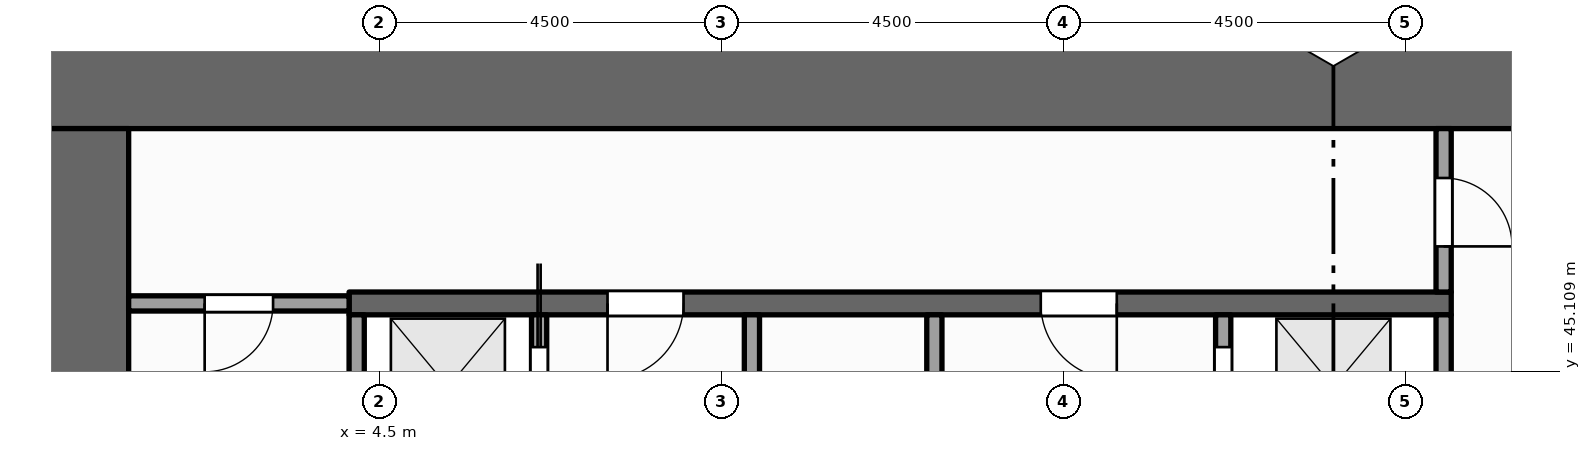
"""IFC4 building model, lengths in metres.
Left out: names, types, materials, properties, quantities, classifications, styles, units other than length and angle.
Written with IfcOpenShell. Run it as: python <this file> out.ifc"""

import sys

from ifc_helpers import new_model, si_unit, direction, frame, frame_2d, origin, place, context, subcontext, project, spatial, rectangle, extrude, element, fill, save


model = new_model("IFC4")
c1 = context("Model", 3, precision=1e-05, world=origin(), true_north=direction((0.0, 1.0)))
c2 = subcontext(c1, "Body", "Model", "MODEL_VIEW")
j1 = project(units=[si_unit("LENGTHUNIT", "METRE"), si_unit("PLANEANGLEUNIT", "RADIAN")], contexts=[c1])
p1 = place(None, origin())
s1 = spatial("IfcSite", under=j1, at=p1, CompositionType="ELEMENT")
p2 = place(p1, origin())
s2 = spatial("IfcBuilding", under=s1, at=p2, CompositionType="ELEMENT")
p3 = place(p2, frame((0.0, 0.0, 61.0)))
s3 = spatial("IfcBuildingStorey", under=s2, at=p3, CompositionType="ELEMENT", Elevation=61.0)
p4 = place(p3, frame((0.0, 48.9, -0.15), z_axis=(0.0, 0.0, 1.0), x_axis=(1.0, 0.0, 0.0)))
e1 = element("IfcWall", 1, at=p4, inside=s3, PredefinedType="SHEAR", context=c2, shape_type="SweptSolid", body=[
    extrude(rectangle(XDim=22.5, YDim=1.2, at=frame_2d((11.25, 0.0))), origin(), (0.0, 0.0, 1.0), 4.0),
])
p5 = place(p3, frame((0.6, 37.2, -0.15), z_axis=(0.0, 0.0, 1.0), x_axis=(0.0, 1.0, 0.0)))
e2 = element("IfcWall", 2, at=p5, inside=s3, PredefinedType="SHEAR", context=c2, shape_type="SweptSolid", body=[
    extrude(rectangle(XDim=11.1, YDim=1.2, at=frame_2d((5.55, 0.0))), origin(), (0.0, 0.0, 1.0), 4.0),
])
p6 = place(p3, frame((4.2, 43.525, 0.0), z_axis=(0.0, 0.0, 1.0), x_axis=(0.0, 1.0, 0.0)))
e3 = element("IfcWall", 3, at=p6, inside=s3, PredefinedType="SOLIDWALL", context=c2, shape_type="SweptSolid", body=[
    extrude(rectangle(XDim=2.325, YDim=0.2, at=frame_2d((1.163, 0.0))), origin(), (0.0, 0.0, 1.0), 3.85),
])
p7 = place(p3, frame((6.6, 37.2, 0.0), z_axis=(0.0, 0.0, 1.0), x_axis=(0.0, 1.0, 0.0)))
e4 = element("IfcWall", 4, at=p7, inside=s3, PredefinedType="SOLIDWALL", context=c2, shape_type="SweptSolid", body=[
    extrude(rectangle(XDim=8.65, YDim=0.2, at=frame_2d((4.325, 0.0))), origin(), (0.0, 0.0, 1.0), 3.85),
])
p8 = place(p7, frame((0.5, 0.0, 0.012)))
e5 = element("IfcOpeningElement", 5, at=p8, cuts=e4, PredefinedType="OPENING", context=c2, shape_type="SweptSolid", body=[
    extrude(rectangle(XDim=1.1, YDim=2.1, at=frame_2d((0.55, 1.05))), frame((0.0, 0.11, 0.0), z_axis=(0.0, -1.0, 0.0), x_axis=(1.0, 0.0, 0.0)), (0.0, 0.0, 1.0), 0.22),
])
p9 = place(p7, frame((2.75, 0.0, 0.012)))
e6 = element("IfcOpeningElement", 6, at=p9, cuts=e4, PredefinedType="OPENING", context=c2, shape_type="SweptSolid", body=[
    extrude(rectangle(XDim=1.1, YDim=2.1, at=frame_2d((0.55, 1.05))), frame((0.0, 0.11, 0.0), z_axis=(0.0, -1.0, 0.0), x_axis=(1.0, 0.0, 0.0)), (0.0, 0.0, 1.0), 0.22),
])
p10 = place(p7, frame((4.95, 0.0, 0.012)))
e7 = element("IfcOpeningElement", 7, at=p10, cuts=e4, PredefinedType="OPENING", context=c2, shape_type="SweptSolid", body=[
    extrude(rectangle(XDim=1.1, YDim=2.1, at=frame_2d((0.55, 1.05))), frame((0.0, 0.11, 0.0), z_axis=(0.0, -1.0, 0.0), x_axis=(1.0, 0.0, 0.0)), (0.0, 0.0, 1.0), 0.22),
])
p11 = place(p7, frame((7.125, 0.0, 0.012)))
e8 = element("IfcOpeningElement", 8, at=p11, cuts=e4, PredefinedType="OPENING", context=c2, shape_type="SweptSolid", body=[
    extrude(rectangle(XDim=1.1, YDim=2.1, at=frame_2d((0.55, 1.05))), frame((0.0, 0.11, 0.0), z_axis=(0.0, -1.0, 0.0), x_axis=(1.0, 0.0, 0.0)), (0.0, 0.0, 1.0), 0.22),
])
p12 = place(p3, frame((9.4, 37.2, 0.0), z_axis=(0.0, 0.0, 1.0), x_axis=(0.0, 1.0, 0.0)))
e9 = element("IfcWall", 9, at=p12, inside=s3, PredefinedType="PARTITIONING", context=c2, shape_type="SweptSolid", body=[
    extrude(rectangle(XDim=8.65, YDim=0.2, at=frame_2d((4.325, 0.0))), origin(), (0.0, 0.0, 1.0), 3.85),
])
p13 = place(p12, frame((3.875, 0.0, 0.0)))
e10 = element("IfcOpeningElement", 10, at=p13, cuts=e9, PredefinedType="OPENING", context=c2, shape_type="SweptSolid", body=[
    extrude(rectangle(XDim=0.9, YDim=2.1, at=frame_2d((0.45, 1.05))), frame((0.0, 0.11, 0.0), z_axis=(0.0, -1.0, 0.0), x_axis=(1.0, 0.0, 0.0)), (0.0, 0.0, 1.0), 0.22),
])
p14 = place(p3, frame((11.8, 37.2, 0.0), z_axis=(0.0, 0.0, 1.0), x_axis=(0.0, 1.0, 0.0)))
e11 = element("IfcWall", 11, at=p14, inside=s3, PredefinedType="PARTITIONING", context=c2, shape_type="SweptSolid", body=[
    extrude(rectangle(XDim=8.65, YDim=0.2, at=frame_2d((4.325, 0.0))), origin(), (0.0, 0.0, 1.0), 3.85),
])
p15 = place(p3, frame((15.6, 43.7, 0.0), z_axis=(0.0, 0.0, 1.0), x_axis=(0.0, 1.0, 0.0)))
e12 = element("IfcWall", 12, at=p15, inside=s3, PredefinedType="SOLIDWALL", context=c2, shape_type="SweptSolid", body=[
    extrude(rectangle(XDim=2.15, YDim=0.2, at=frame_2d((1.075, 0.0))), origin(), (0.0, 0.0, 1.0), 3.85),
])
p16 = place(p15, frame((0.625, 0.0, 0.012)))
e13 = element("IfcOpeningElement", 13, at=p16, cuts=e12, PredefinedType="OPENING", context=c2, shape_type="SweptSolid", body=[
    extrude(rectangle(XDim=1.1, YDim=2.1, at=frame_2d((0.55, 1.05))), frame((0.0, 0.11, 0.0), z_axis=(0.0, -1.0, 0.0), x_axis=(1.0, 0.0, 0.0)), (0.0, 0.0, 1.0), 0.22),
])
p17 = place(p3, frame((18.5, 43.7, 0.0), z_axis=(0.0, 0.0, 1.0), x_axis=(0.0, 1.0, 0.0)))
e14 = element("IfcWall", 14, at=p17, inside=s3, PredefinedType="SOLIDWALL", context=c2, shape_type="SweptSolid", body=[
    extrude(rectangle(XDim=2.15, YDim=0.2, at=frame_2d((1.075, 0.0))), origin(), (0.0, 0.0, 1.0), 3.85),
])
p18 = place(p3, frame((18.5, 46.15, 0.0), z_axis=(0.0, 0.0, 1.0), x_axis=(0.0, 1.0, 0.0)))
e15 = element("IfcWall", 15, at=p18, inside=s3, PredefinedType="PARTITIONING", context=c2, shape_type="SweptSolid", body=[
    extrude(rectangle(XDim=2.15, YDim=0.2, at=frame_2d((1.075, 0.0))), origin(), (0.0, 0.0, 1.0), 3.85),
])
p19 = place(p18, frame((0.6, 0.0, 0.0)))
e16 = element("IfcOpeningElement", 16, at=p19, cuts=e15, PredefinedType="OPENING", context=c2, shape_type="SweptSolid", body=[
    extrude(rectangle(XDim=0.9, YDim=2.1, at=frame_2d((0.45, 1.05))), frame((0.0, 0.11, 0.0), z_axis=(0.0, -1.0, 0.0), x_axis=(1.0, 0.0, 0.0)), (0.0, 0.0, 1.0), 0.22),
])
p20 = place(p3, frame((1.2, 46.0, 0.0), z_axis=(0.0, 0.0, 1.0), x_axis=(1.0, 0.0, 0.0)))
e17 = element("IfcWall", 17, at=p20, inside=s3, PredefinedType="PARTITIONING", context=c2, shape_type="SweptSolid", body=[
    extrude(rectangle(XDim=2.9, YDim=0.2, at=frame_2d((1.45, 0.0))), origin(), (0.0, 0.0, 1.0), 3.85),
])
p21 = place(p20, frame((1.0, 0.0, 0.0)))
e18 = element("IfcOpeningElement", 18, at=p21, cuts=e17, PredefinedType="OPENING", context=c2, shape_type="SweptSolid", body=[
    extrude(rectangle(XDim=0.9, YDim=2.1, at=frame_2d((0.45, 1.05))), frame((0.0, 0.11, 0.0), z_axis=(0.0, -1.0, 0.0), x_axis=(1.0, 0.0, 0.0)), (0.0, 0.0, 1.0), 0.22),
])
p22 = place(p3, frame((4.1, 46.0, 0.0), z_axis=(0.0, 0.0, 1.0), x_axis=(1.0, 0.0, 0.0)))
e19 = element("IfcWall", 19, at=p22, inside=s3, PredefinedType="SHEAR", context=c2, shape_type="SweptSolid", body=[
    extrude(rectangle(XDim=14.5, YDim=0.3, at=frame_2d((7.25, 0.0))), origin(), (0.0, 0.0, 1.0), 3.85),
])
p23 = place(p22, frame((3.4, 0.0, 0.0)))
e20 = element("IfcOpeningElement", 20, at=p23, cuts=e19, PredefinedType="OPENING", context=c2, shape_type="SweptSolid", body=[
    extrude(rectangle(XDim=1.0, YDim=2.1, at=frame_2d((0.5, 1.05))), frame((0.0, 0.16, 0.0), z_axis=(0.0, -1.0, 0.0), x_axis=(1.0, 0.0, 0.0)), (0.0, 0.0, 1.0), 0.32),
])
p24 = place(p22, frame((9.1, 0.0, 0.0)))
e21 = element("IfcOpeningElement", 21, at=p24, cuts=e19, PredefinedType="OPENING", context=c2, shape_type="SweptSolid", body=[
    extrude(rectangle(XDim=1.0, YDim=2.1, at=frame_2d((0.5, 1.05))), frame((0.0, 0.16, 0.0), z_axis=(0.0, -1.0, 0.0), x_axis=(1.0, 0.0, 0.0)), (0.0, 0.0, 1.0), 0.32),
])
p25 = place(p11, origin())
e22 = element("IfcDoor", 22, at=p25, inside=s3, OperationType="SLIDING_TO_RIGHT", PredefinedType="DOOR", context=c2, shape_type="SweptSolid", body=[
    extrude(rectangle(XDim=1.1, YDim=2.1, at=frame_2d((0.55, 1.05))), frame((0.0, 0.025, 0.0), z_axis=(0.0, -1.0, 0.0), x_axis=(1.0, 0.0, 0.0)), (0.0, 0.0, 1.0), 0.05),
])
fill(e8, e22)
p26 = place(p16, origin())
e23 = element("IfcDoor", 23, at=p26, inside=s3, OperationType="SLIDING_TO_LEFT", PredefinedType="DOOR", context=c2, shape_type="SweptSolid", body=[
    extrude(rectangle(XDim=1.1, YDim=2.1, at=frame_2d((0.55, 1.05))), frame((0.0, 0.025, 0.0), z_axis=(0.0, -1.0, 0.0), x_axis=(1.0, 0.0, 0.0)), (0.0, 0.0, 1.0), 0.05),
])
fill(e13, e23)
p27 = place(p23, origin())
e24 = element("IfcDoor", 24, at=p27, inside=s3, OperationType="SINGLE_SWING_LEFT", PredefinedType="DOOR", context=c2, shape_type="SweptSolid", body=[
    extrude(rectangle(XDim=1.0, YDim=2.1, at=frame_2d((0.5, 1.05))), frame((0.0, 0.025, 0.0), z_axis=(0.0, -1.0, 0.0), x_axis=(1.0, 0.0, 0.0)), (0.0, 0.0, 1.0), 0.05),
])
fill(e20, e24)
p28 = place(p24, origin())
e25 = element("IfcDoor", 25, at=p28, inside=s3, OperationType="SINGLE_SWING_RIGHT", PredefinedType="DOOR", context=c2, shape_type="SweptSolid", body=[
    extrude(rectangle(XDim=1.0, YDim=2.1, at=frame_2d((0.5, 1.05))), frame((0.0, 0.025, 0.0), z_axis=(0.0, -1.0, 0.0), x_axis=(1.0, 0.0, 0.0)), (0.0, 0.0, 1.0), 0.05),
])
fill(e21, e25)
p29 = place(p21, origin())
e26 = element("IfcDoor", 26, at=p29, inside=s3, OperationType="SINGLE_SWING_LEFT", PredefinedType="DOOR", context=c2, shape_type="SweptSolid", body=[
    extrude(rectangle(XDim=0.9, YDim=2.1, at=frame_2d((0.45, 1.05))), frame((0.0, 0.025, 0.0), z_axis=(0.0, -1.0, 0.0), x_axis=(1.0, 0.0, 0.0)), (0.0, 0.0, 1.0), 0.05),
])
fill(e18, e26)
p30 = place(p19, origin())
e27 = element("IfcDoor", 27, at=p30, inside=s3, OperationType="SINGLE_SWING_LEFT", PredefinedType="DOOR", context=c2, shape_type="SweptSolid", body=[
    extrude(rectangle(XDim=0.9, YDim=2.1, at=frame_2d((0.45, 1.05))), frame((0.0, 0.025, 0.0), z_axis=(0.0, -1.0, 0.0), x_axis=(1.0, 0.0, 0.0)), (0.0, 0.0, 1.0), 0.05),
])
fill(e16, e27)
save(model, sys.argv[1])
